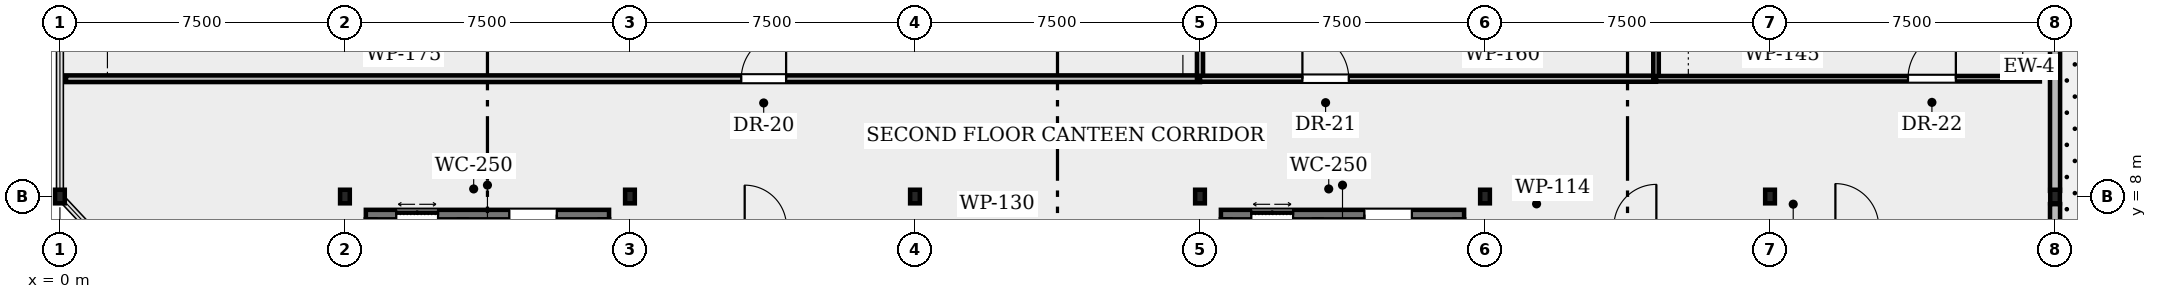
"""IFC4 building model, lengths in metres.
Left out: names, types, materials, properties, quantities, classifications, styles, units other than length and angle.
Written with IfcOpenShell. Run it as: python <this file> out.ifc"""

import sys

from ifc_helpers import new_model, si_unit, direction, frame, frame_2d, origin, origin_2d, place, context, subcontext, project, spatial, rectangle, i_section, extrude, element, fill, save


model = new_model("IFC4")
c1 = context("Model", 3, precision=1e-05, world=origin(), true_north=direction((0.0, 1.0)))
c2 = subcontext(c1, "Body", "Model", "MODEL_VIEW")
j1 = project(units=[si_unit("LENGTHUNIT", "METRE"), si_unit("PLANEANGLEUNIT", "RADIAN")], contexts=[c1])
p1 = place(None, origin())
s1 = spatial("IfcSite", under=j1, at=p1, CompositionType="ELEMENT")
p2 = place(p1, origin())
s2 = spatial("IfcBuilding", under=s1, at=p2, CompositionType="ELEMENT")
p3 = place(p2, frame((0.0, 0.0, 9.0)))
s3 = spatial("IfcBuildingStorey", under=s2, at=p3, CompositionType="ELEMENT", Elevation=9.0)
for number, where, z_axis, x_axis in (
    (1, (0.0, 8.0, 0.0), (0.0, 0.0, 1.0), (1.0, 0.0, 0.0)),
    (2, (7.5, 8.0, 0.0), (0.0, 0.0, 1.0), (1.0, 0.0, 0.0)),
    (3, (15.0, 8.0, 0.0), (0.0, 0.0, 1.0), (1.0, 0.0, 0.0)),
    (4, (22.5, 8.0, 0.0), (0.0, 0.0, 1.0), (1.0, 0.0, 0.0)),
    (5, (30.0, 8.0, 0.0), (0.0, 0.0, 1.0), (1.0, 0.0, 0.0)),
    (6, (37.5, 8.0, 0.0), (0.0, 0.0, 1.0), (1.0, 0.0, 0.0)),
    (7, (45.0, 8.0, 0.0), (0.0, 0.0, 1.0), (1.0, 0.0, 0.0)),
    (8, (52.5, 8.0, 0.0), (0.0, 0.0, 1.0), (1.0, 0.0, 0.0)),
):
    element("IfcColumn", number, at=place(p3, frame(where, z_axis=z_axis, x_axis=x_axis)), inside=s3, PredefinedType="COLUMN", context=c2, shape_type="SweptSolid", body=[
        extrude(i_section(OverallWidth=0.255, OverallDepth=0.357, WebThickness=0.01, FlangeThickness=0.018, FilletRadius=0.015, at=origin_2d()), origin(), (0.0, 0.0, 1.0), 4.927),
    ])
p4 = place(p3, frame((52.5, 0.2, 0.0), z_axis=(0.0, 0.0, 1.0), x_axis=(0.0, 1.0, 0.0)))
e9 = element("IfcWall", 9, at=p4, inside=s3, PredefinedType="SOLIDWALL", context=c2, shape_type="SweptSolid", body=[
    extrude(rectangle(XDim=7.6, YDim=0.265, at=frame_2d((3.8, 0.0))), origin(), (0.0, 0.0, 1.0), 4.035),
])
p5 = place(p3, frame((52.5, 8.15, 0.0), z_axis=(0.0, 0.0, 1.0), x_axis=(0.0, 1.0, 0.0)))
e10 = element("IfcWall", 10, at=p5, inside=s3, PredefinedType="SOLIDWALL", context=c2, shape_type="SweptSolid", body=[
    extrude(rectangle(XDim=15.7, YDim=0.265, at=frame_2d((7.85, 0.0))), origin(), (0.0, 0.0, 1.0), 4.3),
])
p6 = place(p5, frame((6.5, 0.0, 0.0)))
e11 = element("IfcOpeningElement", 11, at=p6, cuts=e10, PredefinedType="OPENING", context=c2, shape_type="SweptSolid", body=[
    extrude(rectangle(XDim=1.65, YDim=2.15, at=frame_2d((0.825, 1.075))), frame((0.0, 0.142, 0.0), z_axis=(0.0, -1.0, 0.0), x_axis=(1.0, 0.0, 0.0)), (0.0, 0.0, 1.0), 0.285),
])
p7 = place(p5, frame((11.2, 0.0, 0.0)))
e12 = element("IfcOpeningElement", 12, at=p7, cuts=e10, PredefinedType="OPENING", context=c2, shape_type="SweptSolid", body=[
    extrude(rectangle(XDim=1.5, YDim=2.15, at=frame_2d((0.75, 1.075))), frame((0.0, 0.142, 0.0), z_axis=(0.0, -1.0, 0.0), x_axis=(1.0, 0.0, 0.0)), (0.0, 0.0, 1.0), 0.285),
])
p8 = place(p3, frame((8.05, 7.525, 0.0), z_axis=(0.0, 0.0, 1.0), x_axis=(1.0, 0.0, 0.0)))
e13 = element("IfcWall", 13, at=p8, inside=s3, PredefinedType="SHEAR", context=c2, shape_type="SweptSolid", body=[
    extrude(rectangle(XDim=6.4, YDim=0.25, at=frame_2d((3.2, 0.0))), origin(), (0.0, 0.0, 1.0), 3.65),
])
p9 = place(p8, frame((0.8, 0.0, 0.0)))
e14 = element("IfcOpeningElement", 14, at=p9, cuts=e13, PredefinedType="OPENING", context=c2, shape_type="SweptSolid", body=[
    extrude(rectangle(XDim=1.1, YDim=2.15, at=frame_2d((0.55, 1.075))), frame((0.0, 0.135, 0.0), z_axis=(0.0, -1.0, 0.0), x_axis=(1.0, 0.0, 0.0)), (0.0, 0.0, 1.0), 0.27),
])
p10 = place(p8, frame((3.775, 0.0, 0.0)))
e15 = element("IfcOpeningElement", 15, at=p10, cuts=e13, PredefinedType="OPENING", context=c2, shape_type="SweptSolid", body=[
    extrude(rectangle(XDim=1.25, YDim=2.15, at=frame_2d((0.625, 1.075))), frame((0.0, 0.135, 0.0), z_axis=(0.0, -1.0, 0.0), x_axis=(1.0, 0.0, 0.0)), (0.0, 0.0, 1.0), 0.27),
])
p11 = place(p3, frame((30.55, 7.525, 0.0), z_axis=(0.0, 0.0, 1.0), x_axis=(1.0, 0.0, 0.0)))
e16 = element("IfcWall", 16, at=p11, inside=s3, PredefinedType="SHEAR", context=c2, shape_type="SweptSolid", body=[
    extrude(rectangle(XDim=6.4, YDim=0.25, at=frame_2d((3.2, 0.0))), origin(), (0.0, 0.0, 1.0), 3.65),
])
p12 = place(p11, frame((0.8, 0.0, 0.0)))
e17 = element("IfcOpeningElement", 17, at=p12, cuts=e16, PredefinedType="OPENING", context=c2, shape_type="SweptSolid", body=[
    extrude(rectangle(XDim=1.1, YDim=2.15, at=frame_2d((0.55, 1.075))), frame((0.0, 0.135, 0.0), z_axis=(0.0, -1.0, 0.0), x_axis=(1.0, 0.0, 0.0)), (0.0, 0.0, 1.0), 0.27),
])
p13 = place(p11, frame((3.775, 0.0, 0.0)))
e18 = element("IfcOpeningElement", 18, at=p13, cuts=e16, PredefinedType="OPENING", context=c2, shape_type="SweptSolid", body=[
    extrude(rectangle(XDim=1.25, YDim=2.15, at=frame_2d((0.625, 1.075))), frame((0.0, 0.135, 0.0), z_axis=(0.0, -1.0, 0.0), x_axis=(1.0, 0.0, 0.0)), (0.0, 0.0, 1.0), 0.27),
])
p14 = place(p3, frame((0.16, 11.1, 0.0), z_axis=(0.0, 0.0, 1.0), x_axis=(1.0, 0.0, 0.0)))
e19 = element("IfcWall", 19, at=p14, inside=s3, PredefinedType="PARTITIONING", context=c2, shape_type="SweptSolid", body=[
    extrude(rectangle(XDim=29.84, YDim=0.175, at=frame_2d((14.92, 0.0))), origin(), (0.0, 0.0, 1.0), 3.7),
])
p15 = place(p14, frame((17.769, 0.0, 0.0)))
e20 = element("IfcOpeningElement", 20, at=p15, cuts=e19, PredefinedType="OPENING", context=c2, shape_type="SweptSolid", body=[
    extrude(rectangle(XDim=1.18, YDim=2.14, at=frame_2d((0.59, 1.07))), frame((0.0, 0.097, 0.0), z_axis=(0.0, -1.0, 0.0), x_axis=(1.0, 0.0, 0.0)), (0.0, 0.0, 1.0), 0.195),
])
p16 = place(p3, frame((30.0, 11.1, 0.0), z_axis=(0.0, 0.0, 1.0), x_axis=(0.0, 1.0, 0.0)))
e21 = element("IfcWall", 21, at=p16, inside=s3, PredefinedType="PARTITIONING", context=c2, shape_type="SweptSolid", body=[
    extrude(rectangle(XDim=12.82, YDim=0.16, at=frame_2d((6.41, 0.0))), origin(), (0.0, 0.0, 1.0), 3.7),
])
p17 = place(p3, frame((30.0, 11.1, 0.0), z_axis=(0.0, 0.0, 1.0), x_axis=(1.0, 0.0, 0.0)))
e22 = element("IfcWall", 22, at=p17, inside=s3, PredefinedType="PARTITIONING", context=c2, shape_type="SweptSolid", body=[
    extrude(rectangle(XDim=12.0, YDim=0.16, at=frame_2d((6.0, 0.0))), origin(), (0.0, 0.0, 1.0), 3.7),
])
p18 = place(p17, frame((2.695, 0.0, 0.0)))
e23 = element("IfcOpeningElement", 23, at=p18, cuts=e22, PredefinedType="OPENING", context=c2, shape_type="SweptSolid", body=[
    extrude(rectangle(XDim=1.22, YDim=2.15, at=frame_2d((0.61, 1.075))), frame((0.0, 0.09, 0.0), z_axis=(0.0, -1.0, 0.0), x_axis=(1.0, 0.0, 0.0)), (0.0, 0.0, 1.0), 0.18),
])
p19 = place(p3, frame((42.0, 11.1, 0.0), z_axis=(0.0, 0.0, 1.0), x_axis=(0.0, 1.0, 0.0)))
e24 = element("IfcWall", 24, at=p19, inside=s3, PredefinedType="PARTITIONING", context=c2, shape_type="SweptSolid", body=[
    extrude(rectangle(XDim=12.82, YDim=0.145, at=frame_2d((6.41, 0.0))), origin(), (0.0, 0.0, 1.0), 3.7),
])
p20 = place(p3, frame((42.0, 11.1, 0.0), z_axis=(0.0, 0.0, 1.0), x_axis=(1.0, 0.0, 0.0)))
e25 = element("IfcWall", 25, at=p20, inside=s3, PredefinedType="PARTITIONING", context=c2, shape_type="SweptSolid", body=[
    extrude(rectangle(XDim=10.1, YDim=0.145, at=frame_2d((5.05, 0.0))), origin(), (0.0, 0.0, 1.0), 3.7),
])
p21 = place(p20, frame((6.63, 0.0, 0.0)))
e26 = element("IfcOpeningElement", 26, at=p21, cuts=e25, PredefinedType="OPENING", context=c2, shape_type="SweptSolid", body=[
    extrude(rectangle(XDim=1.26, YDim=2.16, at=frame_2d((0.63, 1.08))), frame((0.0, 0.083, 0.0), z_axis=(0.0, -1.0, 0.0), x_axis=(1.0, 0.0, 0.0)), (0.0, 0.0, 1.0), 0.165),
])
p22 = place(p9, origin())
e27 = element("IfcDoor", 27, at=p22, inside=s3, OperationType="DOUBLE_DOOR_SLIDING", PredefinedType="DOOR", context=c2, shape_type="SweptSolid", body=[
    extrude(rectangle(XDim=1.1, YDim=2.15, at=frame_2d((0.55, 1.075))), frame((0.0, 0.025, 0.0), z_axis=(0.0, -1.0, 0.0), x_axis=(1.0, 0.0, 0.0)), (0.0, 0.0, 1.0), 0.05),
])
fill(e14, e27)
p23 = place(p10, frame((1.25, 0.0, 0.0), z_axis=(0.0, 0.0, 1.0), x_axis=(-1.0, 0.0, 0.0)))
e28 = element("IfcDoor", 28, at=p23, inside=s3, OperationType="SINGLE_SWING_LEFT", PredefinedType="DOOR", context=c2, shape_type="SweptSolid", body=[
    extrude(rectangle(XDim=1.25, YDim=2.15, at=frame_2d((0.625, 1.075))), frame((0.0, 0.025, 0.0), z_axis=(0.0, -1.0, 0.0), x_axis=(1.0, 0.0, 0.0)), (0.0, 0.0, 1.0), 0.05),
])
fill(e15, e28)
p24 = place(p12, origin())
e29 = element("IfcDoor", 29, at=p24, inside=s3, OperationType="DOUBLE_DOOR_SLIDING", PredefinedType="DOOR", context=c2, shape_type="SweptSolid", body=[
    extrude(rectangle(XDim=1.1, YDim=2.15, at=frame_2d((0.55, 1.075))), frame((0.0, 0.025, 0.0), z_axis=(0.0, -1.0, 0.0), x_axis=(1.0, 0.0, 0.0)), (0.0, 0.0, 1.0), 0.05),
])
fill(e17, e29)
p25 = place(p13, frame((1.25, 0.0, 0.0), z_axis=(0.0, 0.0, 1.0), x_axis=(-1.0, 0.0, 0.0)))
e30 = element("IfcDoor", 30, at=p25, inside=s3, OperationType="SINGLE_SWING_RIGHT", PredefinedType="DOOR", context=c2, shape_type="SweptSolid", body=[
    extrude(rectangle(XDim=1.25, YDim=2.15, at=frame_2d((0.625, 1.075))), frame((0.0, 0.025, 0.0), z_axis=(0.0, -1.0, 0.0), x_axis=(1.0, 0.0, 0.0)), (0.0, 0.0, 1.0), 0.05),
])
fill(e18, e30)
p26 = place(p15, origin())
e31 = element("IfcDoor", 31, at=p26, inside=s3, OperationType="SINGLE_SWING_RIGHT", PredefinedType="DOOR", context=c2, shape_type="SweptSolid", body=[
    extrude(rectangle(XDim=1.18, YDim=2.14, at=frame_2d((0.59, 1.07))), frame((0.0, 0.025, 0.0), z_axis=(0.0, -1.0, 0.0), x_axis=(1.0, 0.0, 0.0)), (0.0, 0.0, 1.0), 0.05),
])
fill(e20, e31)
p27 = place(p18, origin())
e32 = element("IfcDoor", 32, at=p27, inside=s3, OperationType="SINGLE_SWING_LEFT", PredefinedType="DOOR", context=c2, shape_type="SweptSolid", body=[
    extrude(rectangle(XDim=1.22, YDim=2.15, at=frame_2d((0.61, 1.075))), frame((0.0, 0.025, 0.0), z_axis=(0.0, -1.0, 0.0), x_axis=(1.0, 0.0, 0.0)), (0.0, 0.0, 1.0), 0.05),
])
fill(e23, e32)
p28 = place(p21, origin())
e33 = element("IfcDoor", 33, at=p28, inside=s3, OperationType="SINGLE_SWING_RIGHT", PredefinedType="DOOR", context=c2, shape_type="SweptSolid", body=[
    extrude(rectangle(XDim=1.26, YDim=2.16, at=frame_2d((0.63, 1.08))), frame((0.0, 0.025, 0.0), z_axis=(0.0, -1.0, 0.0), x_axis=(1.0, 0.0, 0.0)), (0.0, 0.0, 1.0), 0.05),
])
fill(e26, e33)
save(model, sys.argv[1])
